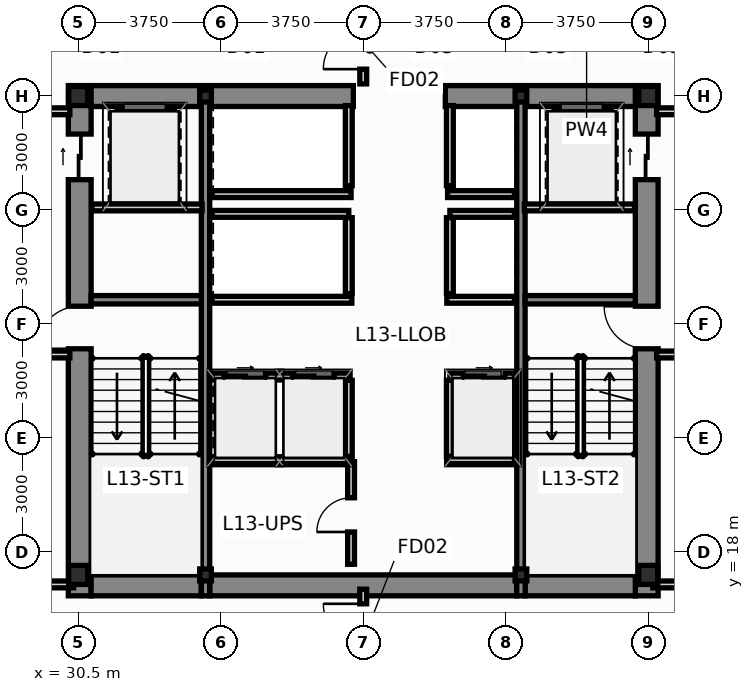
"""IFC4 building model, lengths in metres.
Left out: names, types, materials, properties, quantities, classifications, styles, units other than length and angle.
Written with IfcOpenShell. Run it as: python <this file> out.ifc"""

import sys

from ifc_helpers import new_model, si_unit, direction, frame, frame_2d, origin, origin_2d, place, context, subcontext, project, spatial, rectangle, i_section, extrude, source, transform, mapped, element, fill, save


model = new_model("IFC4")
c1 = context("Model", 3, precision=1e-05, world=origin(), true_north=direction((0.0, 1.0)))
c2 = subcontext(c1, "Body", "Model", "MODEL_VIEW")
j1 = project(units=[si_unit("LENGTHUNIT", "METRE"), si_unit("PLANEANGLEUNIT", "RADIAN")], contexts=[c1])
p1 = place(None, origin())
s1 = spatial("IfcSite", under=j1, at=p1, CompositionType="ELEMENT")
p2 = place(p1, origin())
s2 = spatial("IfcBuilding", under=s1, at=p2, CompositionType="ELEMENT")
p3 = place(p2, frame((0.0, 0.0, 53.15)))
s3 = spatial("IfcBuildingStorey", under=s2, at=p3, CompositionType="ELEMENT", Elevation=53.15)
m1 = source(origin(), c2, "Body", "SweptSolid", [
    extrude(i_section(OverallWidth=0.5, OverallDepth=0.5, WebThickness=0.028, FlangeThickness=0.04, at=origin_2d()), origin(), (0.0, 0.0, 1.0), 3.65),
])
for number, where, z_axis, x_axis in (
    (1, (30.5, 17.4, 0.0), (0.0, 0.0, 1.0), (1.0, 0.0, 0.0)),
    (2, (45.5, 17.4, 0.0), (0.0, 0.0, 1.0), (1.0, 0.0, 0.0)),
    (3, (45.5, 30.0, 0.0), (0.0, 0.0, 1.0), (1.0, 0.0, 0.0)),
    (4, (30.5, 30.0, 0.0), (0.0, 0.0, 1.0), (1.0, 0.0, 0.0)),
):
    element("IfcColumn", number, at=place(p3, frame(where, z_axis=z_axis, x_axis=x_axis)), inside=s3, PredefinedType="COLUMN", context=c2, shape_type="MappedRepresentation", body=[
        mapped(m1, transform((0.0, 0.0, 0.0), scale=1.0)),
    ])
m2 = source(origin(), c2, "Body", "SweptSolid", [
    extrude(i_section(OverallWidth=0.307, OverallDepth=0.315, WebThickness=0.012, FlangeThickness=0.019, at=origin_2d()), origin(), (0.0, 0.0, 1.0), 3.65),
])
for number, where, z_axis, x_axis in (
    (5, (33.85, 17.4, 0.0), (0.0, 0.0, 1.0), (1.0, 0.0, 0.0)),
    (6, (42.15, 17.4, 0.0), (0.0, 0.0, 1.0), (1.0, 0.0, 0.0)),
    (7, (33.85, 30.0, 0.0), (0.0, 0.0, 1.0), (1.0, 0.0, 0.0)),
    (8, (42.15, 30.0, 0.0), (0.0, 0.0, 1.0), (1.0, 0.0, 0.0)),
):
    element("IfcColumn", number, at=place(p3, frame(where, z_axis=z_axis, x_axis=x_axis)), inside=s3, PredefinedType="COLUMN", context=c2, shape_type="MappedRepresentation", body=[
        mapped(m2, transform((0.0, 0.0, 0.0), scale=1.0)),
    ])
p4 = place(p3, frame((30.54, 16.85, 0.0), z_axis=(0.0, 0.0, 1.0), x_axis=(0.0, 1.0, 0.0)))
e9 = element("IfcWall", 9, at=p4, inside=s3, PredefinedType="SHEAR", context=c2, shape_type="SweptSolid", body=[
    extrude(rectangle(XDim=13.425, YDim=0.6, at=frame_2d((6.712, 0.0))), origin(), (0.0, 0.0, 1.0), 3.65),
])
p5 = place(p4, frame((6.5, 0.0, 0.0)))
e10 = element("IfcOpeningElement", 10, at=p5, cuts=e9, PredefinedType="OPENING", context=c2, shape_type="SweptSolid", body=[
    extrude(rectangle(XDim=1.12, YDim=2.15, at=frame_2d((0.56, 1.075))), frame((0.0, 0.312, 0.0), z_axis=(0.0, -1.0, 0.0), x_axis=(1.0, 0.0, 0.0)), (0.0, 0.0, 1.0), 0.624),
])
p6 = place(p4, frame((10.95, 0.0, 0.0)))
e11 = element("IfcOpeningElement", 11, at=p6, cuts=e9, PredefinedType="OPENING", context=c2, shape_type="SweptSolid", body=[
    extrude(rectangle(XDim=1.2, YDim=2.2, at=frame_2d((0.6, 1.1))), frame((0.0, 0.312, 0.0), z_axis=(0.0, -1.0, 0.0), x_axis=(1.0, 0.0, 0.0)), (0.0, 0.0, 1.0), 0.624),
])
p7 = place(p3, frame((45.46, 16.85, 0.0), z_axis=(0.0, 0.0, 1.0), x_axis=(0.0, 1.0, 0.0)))
e12 = element("IfcWall", 12, at=p7, inside=s3, PredefinedType="SHEAR", context=c2, shape_type="SweptSolid", body=[
    extrude(rectangle(XDim=13.425, YDim=0.6, at=frame_2d((6.712, 0.0))), origin(), (0.0, 0.0, 1.0), 3.65),
])
p8 = place(p7, frame((6.5, 0.0, 0.0)))
e13 = element("IfcOpeningElement", 13, at=p8, cuts=e12, PredefinedType="OPENING", context=c2, shape_type="SweptSolid", body=[
    extrude(rectangle(XDim=1.12, YDim=2.15, at=frame_2d((0.56, 1.075))), frame((0.0, 0.312, 0.0), z_axis=(0.0, -1.0, 0.0), x_axis=(1.0, 0.0, 0.0)), (0.0, 0.0, 1.0), 0.624),
])
p9 = place(p7, frame((10.95, 0.0, 0.0)))
e14 = element("IfcOpeningElement", 14, at=p9, cuts=e12, PredefinedType="OPENING", context=c2, shape_type="SweptSolid", body=[
    extrude(rectangle(XDim=1.2, YDim=2.2, at=frame_2d((0.6, 1.1))), frame((0.0, 0.312, 0.0), z_axis=(0.0, -1.0, 0.0), x_axis=(1.0, 0.0, 0.0)), (0.0, 0.0, 1.0), 0.624),
])
p10 = place(p3, frame((30.84, 17.125, 0.0), z_axis=(0.0, 0.0, 1.0), x_axis=(1.0, 0.0, 0.0)))
e15 = element("IfcWall", 15, at=p10, inside=s3, PredefinedType="SHEAR", context=c2, shape_type="SweptSolid", body=[
    extrude(rectangle(XDim=2.9, YDim=0.55, at=frame_2d((1.45, 0.0))), origin(), (0.0, 0.0, 1.0), 3.65),
])
p11 = place(p3, frame((33.96, 17.125, 0.0), z_axis=(0.0, 0.0, 1.0), x_axis=(1.0, 0.0, 0.0)))
e16 = element("IfcWall", 16, at=p11, inside=s3, PredefinedType="SHEAR", context=c2, shape_type="SweptSolid", body=[
    extrude(rectangle(XDim=8.08, YDim=0.55, at=frame_2d((4.04, 0.0))), origin(), (0.0, 0.0, 1.0), 3.65),
])
for number, where, z_axis, x_axis in (
    (17, (42.26, 17.125, 0.0), (0.0, 0.0, 1.0), (1.0, 0.0, 0.0)),
    (18, (30.84, 30.0, 0.0), (0.0, 0.0, 1.0), (1.0, 0.0, 0.0)),
):
    element("IfcWall", number, at=place(p3, frame(where, z_axis=z_axis, x_axis=x_axis)), inside=s3, PredefinedType="SHEAR", context=c2, shape_type="SweptSolid", body=[
        extrude(rectangle(XDim=2.9, YDim=0.55, at=frame_2d((1.45, 0.0))), origin(), (0.0, 0.0, 1.0), 3.65),
    ])
p12 = place(p3, frame((33.96, 30.0, 0.0), z_axis=(0.0, 0.0, 1.0), x_axis=(1.0, 0.0, 0.0)))
e19 = element("IfcWall", 19, at=p12, inside=s3, PredefinedType="SHEAR", context=c2, shape_type="SweptSolid", body=[
    extrude(rectangle(XDim=3.78, YDim=0.55, at=frame_2d((1.89, 0.0))), origin(), (0.0, 0.0, 1.0), 3.65),
])
p13 = place(p3, frame((40.16, 30.0, 0.0), z_axis=(0.0, 0.0, 1.0), x_axis=(1.0, 0.0, 0.0)))
e20 = element("IfcWall", 20, at=p13, inside=s3, PredefinedType="SHEAR", context=c2, shape_type="SweptSolid", body=[
    extrude(rectangle(XDim=1.88, YDim=0.55, at=frame_2d((0.94, 0.0))), origin(), (0.0, 0.0, 1.0), 3.65),
])
p14 = place(p3, frame((42.26, 30.0, 0.0), z_axis=(0.0, 0.0, 1.0), x_axis=(1.0, 0.0, 0.0)))
e21 = element("IfcWall", 21, at=p14, inside=s3, PredefinedType="SHEAR", context=c2, shape_type="SweptSolid", body=[
    extrude(rectangle(XDim=2.9, YDim=0.55, at=frame_2d((1.45, 0.0))), origin(), (0.0, 0.0, 1.0), 3.65),
])
for number, where, z_axis, x_axis in (
    (22, (33.85, 16.85, 0.0), (0.0, 0.0, 1.0), (0.0, 1.0, 0.0)),
    (23, (42.15, 16.85, 0.0), (0.0, 0.0, 1.0), (0.0, 1.0, 0.0)),
):
    element("IfcWall", number, at=place(p3, frame(where, z_axis=z_axis, x_axis=x_axis)), inside=s3, PredefinedType="SHEAR", context=c2, shape_type="SweptSolid", body=[
        extrude(rectangle(XDim=13.425, YDim=0.22, at=frame_2d((6.712, 0.0))), origin(), (0.0, 0.0, 1.0), 3.65),
    ])
for number, where, z_axis, x_axis in (
    (24, (30.84, 24.64, 0.0), (0.0, 0.0, 1.0), (1.0, 0.0, 0.0)),
    (25, (42.26, 24.64, 0.0), (0.0, 0.0, 1.0), (1.0, 0.0, 0.0)),
):
    element("IfcWall", number, at=place(p3, frame(where, z_axis=z_axis, x_axis=x_axis)), inside=s3, PredefinedType="SHEAR", context=c2, shape_type="SweptSolid", body=[
        extrude(rectangle(XDim=2.9, YDim=0.22, at=frame_2d((1.45, 0.0))), origin(), (0.0, 0.0, 1.0), 3.65),
    ])
p15 = place(p3, frame((34.02, 22.62, 0.0), z_axis=(0.0, 0.0, 1.0), x_axis=(1.0, 0.0, 0.0)))
e26 = element("IfcWall", 26, at=p15, inside=s3, PredefinedType="PARTITIONING", context=c2, shape_type="SweptSolid", body=[
    extrude(rectangle(XDim=3.6, YDim=0.18, at=frame_2d((1.8, 0.0))), origin(), (0.0, 0.0, 1.0), 3.4),
])
p16 = place(p15, frame((0.32, 0.0, 0.0)))
e27 = element("IfcOpeningElement", 27, at=p16, cuts=e26, PredefinedType="OPENING", context=c2, shape_type="SweptSolid", body=[
    extrude(rectangle(XDim=1.1, YDim=2.2, at=frame_2d((0.55, 1.1))), frame((0.0, 0.102, 0.0), z_axis=(0.0, -1.0, 0.0), x_axis=(1.0, 0.0, 0.0)), (0.0, 0.0, 1.0), 0.204),
])
p17 = place(p15, frame((2.12, 0.0, 0.0)))
e28 = element("IfcOpeningElement", 28, at=p17, cuts=e26, PredefinedType="OPENING", context=c2, shape_type="SweptSolid", body=[
    extrude(rectangle(XDim=1.1, YDim=2.2, at=frame_2d((0.55, 1.1))), frame((0.0, 0.102, 0.0), z_axis=(0.0, -1.0, 0.0), x_axis=(1.0, 0.0, 0.0)), (0.0, 0.0, 1.0), 0.204),
])
p18 = place(p3, frame((40.28, 22.62, 0.0), z_axis=(0.0, 0.0, 1.0), x_axis=(1.0, 0.0, 0.0)))
e29 = element("IfcWall", 29, at=p18, inside=s3, PredefinedType="PARTITIONING", context=c2, shape_type="SweptSolid", body=[
    extrude(rectangle(XDim=1.7, YDim=0.18, at=frame_2d((0.85, 0.0))), origin(), (0.0, 0.0, 1.0), 3.4),
])
p19 = place(p18, frame((0.35, 0.0, 0.0)))
e30 = element("IfcOpeningElement", 30, at=p19, cuts=e29, PredefinedType="OPENING", context=c2, shape_type="SweptSolid", body=[
    extrude(rectangle(XDim=1.1, YDim=2.2, at=frame_2d((0.55, 1.1))), frame((0.0, 0.102, 0.0), z_axis=(0.0, -1.0, 0.0), x_axis=(1.0, 0.0, 0.0)), (0.0, 0.0, 1.0), 0.204),
])
for number, where, z_axis, x_axis in (
    (31, (37.62, 20.52, 0.0), (0.0, 0.0, 1.0), (0.0, 1.0, 0.0)),
    (32, (40.28, 20.52, 0.0), (0.0, 0.0, 1.0), (0.0, 1.0, 0.0)),
):
    element("IfcWall", number, at=place(p3, frame(where, z_axis=z_axis, x_axis=x_axis)), inside=s3, PredefinedType="PARTITIONING", context=c2, shape_type="SweptSolid", body=[
        extrude(rectangle(XDim=2.0, YDim=0.18, at=frame_2d((1.0, 0.0))), origin(), (0.0, 0.0, 1.0), 3.4),
    ])
p20 = place(p3, frame((34.02, 26.9, 0.0), z_axis=(0.0, 0.0, 1.0), x_axis=(1.0, 0.0, 0.0)))
e33 = element("IfcWall", 33, at=p20, inside=s3, PredefinedType="PARTITIONING", context=c2, shape_type="SweptSolid", body=[
    extrude(rectangle(XDim=3.6, YDim=0.18, at=frame_2d((1.8, 0.0))), origin(), (0.0, 0.0, 1.0), 3.4),
])
p21 = place(p3, frame((40.28, 26.9, 0.0), z_axis=(0.0, 0.0, 1.0), x_axis=(1.0, 0.0, 0.0)))
e34 = element("IfcWall", 34, at=p21, inside=s3, PredefinedType="PARTITIONING", context=c2, shape_type="SweptSolid", body=[
    extrude(rectangle(XDim=1.7, YDim=0.18, at=frame_2d((0.85, 0.0))), origin(), (0.0, 0.0, 1.0), 3.4),
])
for number, where, z_axis, x_axis in (
    (35, (37.62, 24.8, 0.0), (0.0, 0.0, 1.0), (0.0, 1.0, 0.0)),
    (36, (40.28, 24.8, 0.0), (0.0, 0.0, 1.0), (0.0, 1.0, 0.0)),
):
    element("IfcWall", number, at=place(p3, frame(where, z_axis=z_axis, x_axis=x_axis)), inside=s3, PredefinedType="PARTITIONING", context=c2, shape_type="SweptSolid", body=[
        extrude(rectangle(XDim=2.0, YDim=0.18, at=frame_2d((1.0, 0.0))), origin(), (0.0, 0.0, 1.0), 3.4),
    ])
p22 = place(p3, frame((34.02, 24.64, 0.0), z_axis=(0.0, 0.0, 1.0), x_axis=(1.0, 0.0, 0.0)))
e37 = element("IfcWall", 37, at=p22, inside=s3, PredefinedType="PARTITIONING", context=c2, shape_type="SweptSolid", body=[
    extrude(rectangle(XDim=3.68, YDim=0.18, at=frame_2d((1.84, 0.0))), origin(), (0.0, 0.0, 1.0), 3.4),
])
p23 = place(p3, frame((40.2, 24.64, 0.0), z_axis=(0.0, 0.0, 1.0), x_axis=(1.0, 0.0, 0.0)))
e38 = element("IfcWall", 38, at=p23, inside=s3, PredefinedType="PARTITIONING", context=c2, shape_type="SweptSolid", body=[
    extrude(rectangle(XDim=1.78, YDim=0.18, at=frame_2d((0.89, 0.0))), origin(), (0.0, 0.0, 1.0), 3.4),
])
p24 = place(p3, frame((34.02, 27.42, 0.0), z_axis=(0.0, 0.0, 1.0), x_axis=(1.0, 0.0, 0.0)))
e39 = element("IfcWall", 39, at=p24, inside=s3, PredefinedType="PARTITIONING", context=c2, shape_type="SweptSolid", body=[
    extrude(rectangle(XDim=3.66, YDim=0.18, at=frame_2d((1.83, 0.0))), origin(), (0.0, 0.0, 1.0), 3.4),
])
p25 = place(p3, frame((40.22, 27.42, 0.0), z_axis=(0.0, 0.0, 1.0), x_axis=(1.0, 0.0, 0.0)))
e40 = element("IfcWall", 40, at=p25, inside=s3, PredefinedType="PARTITIONING", context=c2, shape_type="SweptSolid", body=[
    extrude(rectangle(XDim=1.76, YDim=0.18, at=frame_2d((0.88, 0.0))), origin(), (0.0, 0.0, 1.0), 3.4),
])
for number, where, z_axis, x_axis in (
    (41, (37.62, 27.64, 0.0), (0.0, 0.0, 1.0), (0.0, 1.0, 0.0)),
    (42, (40.28, 27.64, 0.0), (0.0, 0.0, 1.0), (0.0, 1.0, 0.0)),
):
    element("IfcWall", number, at=place(p3, frame(where, z_axis=z_axis, x_axis=x_axis)), inside=s3, PredefinedType="PARTITIONING", context=c2, shape_type="SweptSolid", body=[
        extrude(rectangle(XDim=2.11, YDim=0.18, at=frame_2d((1.055, 0.0))), origin(), (0.0, 0.0, 1.0), 3.4),
    ])
p26 = place(p3, frame((27.52, 23.2, 0.0), z_axis=(0.0, 0.0, 1.0), x_axis=(1.0, 0.0, 0.0)))
e43 = element("IfcWall", 43, at=p26, inside=s3, PredefinedType="PARTITIONING", context=c2, shape_type="SweptSolid", body=[
    extrude(rectangle(XDim=2.76, YDim=0.18, at=frame_2d((1.38, 0.0))), origin(), (0.0, 0.0, 1.0), 3.4),
])
p27 = place(p3, frame((27.52, 29.6, 0.0), z_axis=(0.0, 0.0, 1.0), x_axis=(1.0, 0.0, 0.0)))
e44 = element("IfcWall", 44, at=p27, inside=s3, PredefinedType="PARTITIONING", context=c2, shape_type="SweptSolid", body=[
    extrude(rectangle(XDim=2.76, YDim=0.18, at=frame_2d((1.38, 0.0))), origin(), (0.0, 0.0, 1.0), 2.783),
])
p28 = place(p3, frame((45.72, 23.2, 0.0), z_axis=(0.0, 0.0, 1.0), x_axis=(1.0, 0.0, 0.0)))
e45 = element("IfcWall", 45, at=p28, inside=s3, PredefinedType="PARTITIONING", context=c2, shape_type="SweptSolid", body=[
    extrude(rectangle(XDim=2.76, YDim=0.18, at=frame_2d((1.38, 0.0))), origin(), (0.0, 0.0, 1.0), 3.4),
])
p29 = place(p3, frame((45.72, 29.6, 0.0), z_axis=(0.0, 0.0, 1.0), x_axis=(1.0, 0.0, 0.0)))
e46 = element("IfcWall", 46, at=p29, inside=s3, PredefinedType="PARTITIONING", context=c2, shape_type="SweptSolid", body=[
    extrude(rectangle(XDim=2.76, YDim=0.18, at=frame_2d((1.38, 0.0))), origin(), (0.0, 0.0, 1.0), 2.783),
])
for number, where, z_axis, x_axis in (
    (47, (30.86, 27.07, 0.0), (0.0, 0.0, 1.0), (1.0, 0.0, 0.0)),
    (48, (42.24, 27.07, 0.0), (0.0, 0.0, 1.0), (1.0, 0.0, 0.0)),
):
    element("IfcWall", number, at=place(p3, frame(where, z_axis=z_axis, x_axis=x_axis)), inside=s3, PredefinedType="PARTITIONING", context=c2, shape_type="SweptSolid", body=[
        extrude(rectangle(XDim=2.9, YDim=0.18, at=frame_2d((1.45, 0.0))), origin(), (0.0, 0.0, 1.0), 3.4),
    ])
p30 = place(p3, frame((34.02, 20.42, 0.0), z_axis=(0.0, 0.0, 1.0), x_axis=(1.0, 0.0, 0.0)))
e49 = element("IfcWall", 49, at=p30, inside=s3, PredefinedType="PARTITIONING", context=c2, shape_type="SweptSolid", body=[
    extrude(rectangle(XDim=3.64, YDim=0.18, at=frame_2d((1.82, 0.0))), origin(), (0.0, 0.0, 1.0), 3.4),
])
p31 = place(p3, frame((40.22, 20.42, 0.0), z_axis=(0.0, 0.0, 1.0), x_axis=(1.0, 0.0, 0.0)))
e50 = element("IfcWall", 50, at=p31, inside=s3, PredefinedType="PARTITIONING", context=c2, shape_type="SweptSolid", body=[
    extrude(rectangle(XDim=1.76, YDim=0.18, at=frame_2d((0.88, 0.0))), origin(), (0.0, 0.0, 1.0), 3.4),
])
p32 = place(p3, frame((37.68, 17.68, 0.0), z_axis=(0.0, 0.0, 1.0), x_axis=(0.0, 1.0, 0.0)))
e51 = element("IfcWall", 51, at=p32, inside=s3, PredefinedType="PARTITIONING", context=c2, shape_type="SweptSolid", body=[
    extrude(rectangle(XDim=2.7, YDim=0.18, at=frame_2d((1.35, 0.0))), origin(), (0.0, 0.0, 1.0), 3.4),
])
p33 = place(p32, frame((0.85, 0.0, 0.0)))
e52 = element("IfcOpeningElement", 52, at=p33, cuts=e51, PredefinedType="OPENING", context=c2, shape_type="SweptSolid", body=[
    extrude(rectangle(XDim=0.9, YDim=2.1, at=frame_2d((0.45, 1.05))), frame((0.0, 0.102, 0.0), z_axis=(0.0, -1.0, 0.0), x_axis=(1.0, 0.0, 0.0)), (0.0, 0.0, 1.0), 0.204),
])
for number, where, z_axis, x_axis in (
    (53, (27.48, 17.15, 0.0), (0.0, 0.0, 1.0), (1.0, 0.0, 0.0)),
    (54, (45.62, 17.15, 0.0), (0.0, 0.0, 1.0), (1.0, 0.0, 0.0)),
):
    element("IfcWall", number, at=place(p3, frame(where, z_axis=z_axis, x_axis=x_axis)), inside=s3, PredefinedType="PARTITIONING", context=c2, shape_type="SweptSolid", body=[
        extrude(rectangle(XDim=2.9, YDim=0.18, at=frame_2d((1.45, 0.0))), origin(), (0.0, 0.0, 1.0), 2.783),
    ])
p34 = place(p3, frame((38.0, 15.205, 0.0), z_axis=(0.0, 0.0, 1.0), x_axis=(0.0, 1.0, 0.0)))
e55 = element("IfcWall", 55, at=p34, inside=s3, PredefinedType="PARTITIONING", context=c2, shape_type="SweptSolid", body=[
    extrude(rectangle(XDim=1.82, YDim=0.18, at=frame_2d((0.91, 0.0))), origin(), (0.0, 0.0, 1.0), 3.4),
])
p35 = place(p34, frame((0.385, 0.0, 0.0)))
e56 = element("IfcOpeningElement", 56, at=p35, cuts=e55, PredefinedType="OPENING", context=c2, shape_type="SweptSolid", body=[
    extrude(rectangle(XDim=1.05, YDim=2.15, at=frame_2d((0.525, 1.075))), frame((0.0, 0.102, 0.0), z_axis=(0.0, -1.0, 0.0), x_axis=(1.0, 0.0, 0.0)), (0.0, 0.0, 1.0), 0.204),
])
p36 = place(p3, frame((38.0, 30.32, 0.0), z_axis=(0.0, 0.0, 1.0), x_axis=(0.0, 1.0, 0.0)))
e57 = element("IfcWall", 57, at=p36, inside=s3, PredefinedType="PARTITIONING", context=c2, shape_type="SweptSolid", body=[
    extrude(rectangle(XDim=1.825, YDim=0.18, at=frame_2d((0.913, 0.0))), origin(), (0.0, 0.0, 1.0), 3.4),
])
p37 = place(p36, frame((0.388, 0.0, 0.0)))
e58 = element("IfcOpeningElement", 58, at=p37, cuts=e57, PredefinedType="OPENING", context=c2, shape_type="SweptSolid", body=[
    extrude(rectangle(XDim=1.05, YDim=2.15, at=frame_2d((0.525, 1.075))), frame((0.0, 0.102, 0.0), z_axis=(0.0, -1.0, 0.0), x_axis=(1.0, 0.0, 0.0)), (0.0, 0.0, 1.0), 0.204),
])
p38 = place(p5, origin())
e59 = element("IfcDoor", 59, at=p38, inside=s3, OperationType="SINGLE_SWING_LEFT", PredefinedType="DOOR", context=c2, shape_type="SweptSolid", body=[
    extrude(rectangle(XDim=1.12, YDim=2.15, at=frame_2d((0.56, 1.075))), frame((0.0, 0.025, 0.0), z_axis=(0.0, -1.0, 0.0), x_axis=(1.0, 0.0, 0.0)), (0.0, 0.0, 1.0), 0.05),
])
fill(e10, e59)
p39 = place(p6, origin())
e60 = element("IfcDoor", 60, at=p39, inside=s3, OperationType="SLIDING_TO_LEFT", PredefinedType="DOOR", context=c2, shape_type="SweptSolid", body=[
    extrude(rectangle(XDim=1.2, YDim=2.2, at=frame_2d((0.6, 1.1))), frame((0.0, 0.025, 0.0), z_axis=(0.0, -1.0, 0.0), x_axis=(1.0, 0.0, 0.0)), (0.0, 0.0, 1.0), 0.05),
])
fill(e11, e60)
p40 = place(p8, origin())
e61 = element("IfcDoor", 61, at=p40, inside=s3, OperationType="SINGLE_SWING_RIGHT", PredefinedType="DOOR", context=c2, shape_type="SweptSolid", body=[
    extrude(rectangle(XDim=1.12, YDim=2.15, at=frame_2d((0.56, 1.075))), frame((0.0, 0.025, 0.0), z_axis=(0.0, -1.0, 0.0), x_axis=(1.0, 0.0, 0.0)), (0.0, 0.0, 1.0), 0.05),
])
fill(e13, e61)
p41 = place(p9, origin())
e62 = element("IfcDoor", 62, at=p41, inside=s3, OperationType="SLIDING_TO_RIGHT", PredefinedType="DOOR", context=c2, shape_type="SweptSolid", body=[
    extrude(rectangle(XDim=1.2, YDim=2.2, at=frame_2d((0.6, 1.1))), frame((0.0, 0.025, 0.0), z_axis=(0.0, -1.0, 0.0), x_axis=(1.0, 0.0, 0.0)), (0.0, 0.0, 1.0), 0.05),
])
fill(e14, e62)
p42 = place(p16, origin())
e63 = element("IfcDoor", 63, at=p42, inside=s3, OperationType="SLIDING_TO_LEFT", PredefinedType="DOOR", context=c2, shape_type="SweptSolid", body=[
    extrude(rectangle(XDim=1.1, YDim=2.2, at=frame_2d((0.55, 1.1))), frame((0.0, 0.025, 0.0), z_axis=(0.0, -1.0, 0.0), x_axis=(1.0, 0.0, 0.0)), (0.0, 0.0, 1.0), 0.05),
])
fill(e27, e63)
p43 = place(p17, origin())
e64 = element("IfcDoor", 64, at=p43, inside=s3, OperationType="SLIDING_TO_RIGHT", PredefinedType="DOOR", context=c2, shape_type="SweptSolid", body=[
    extrude(rectangle(XDim=1.1, YDim=2.2, at=frame_2d((0.55, 1.1))), frame((0.0, 0.025, 0.0), z_axis=(0.0, -1.0, 0.0), x_axis=(1.0, 0.0, 0.0)), (0.0, 0.0, 1.0), 0.05),
])
fill(e28, e64)
p44 = place(p19, origin())
e65 = element("IfcDoor", 65, at=p44, inside=s3, OperationType="SLIDING_TO_LEFT", PredefinedType="DOOR", context=c2, shape_type="SweptSolid", body=[
    extrude(rectangle(XDim=1.1, YDim=2.2, at=frame_2d((0.55, 1.1))), frame((0.0, 0.025, 0.0), z_axis=(0.0, -1.0, 0.0), x_axis=(1.0, 0.0, 0.0)), (0.0, 0.0, 1.0), 0.05),
])
fill(e30, e65)
p45 = place(p33, origin())
e66 = element("IfcDoor", 66, at=p45, inside=s3, OperationType="SINGLE_SWING_LEFT", PredefinedType="DOOR", context=c2, shape_type="SweptSolid", body=[
    extrude(rectangle(XDim=0.9, YDim=2.1, at=frame_2d((0.45, 1.05))), frame((0.0, 0.025, 0.0), z_axis=(0.0, -1.0, 0.0), x_axis=(1.0, 0.0, 0.0)), (0.0, 0.0, 1.0), 0.05),
])
fill(e52, e66)
p46 = place(p35, origin())
e67 = element("IfcDoor", 67, at=p46, inside=s3, OperationType="SINGLE_SWING_RIGHT", PredefinedType="DOOR", context=c2, shape_type="SweptSolid", body=[
    extrude(rectangle(XDim=1.05, YDim=2.15, at=frame_2d((0.525, 1.075))), frame((0.0, 0.025, 0.0), z_axis=(0.0, -1.0, 0.0), x_axis=(1.0, 0.0, 0.0)), (0.0, 0.0, 1.0), 0.05),
])
fill(e56, e67)
p47 = place(p37, origin())
e68 = element("IfcDoor", 68, at=p47, inside=s3, OperationType="SINGLE_SWING_LEFT", PredefinedType="DOOR", context=c2, shape_type="SweptSolid", body=[
    extrude(rectangle(XDim=1.05, YDim=2.15, at=frame_2d((0.525, 1.075))), frame((0.0, 0.025, 0.0), z_axis=(0.0, -1.0, 0.0), x_axis=(1.0, 0.0, 0.0)), (0.0, 0.0, 1.0), 0.05),
])
fill(e58, e68)
save(model, sys.argv[1])
